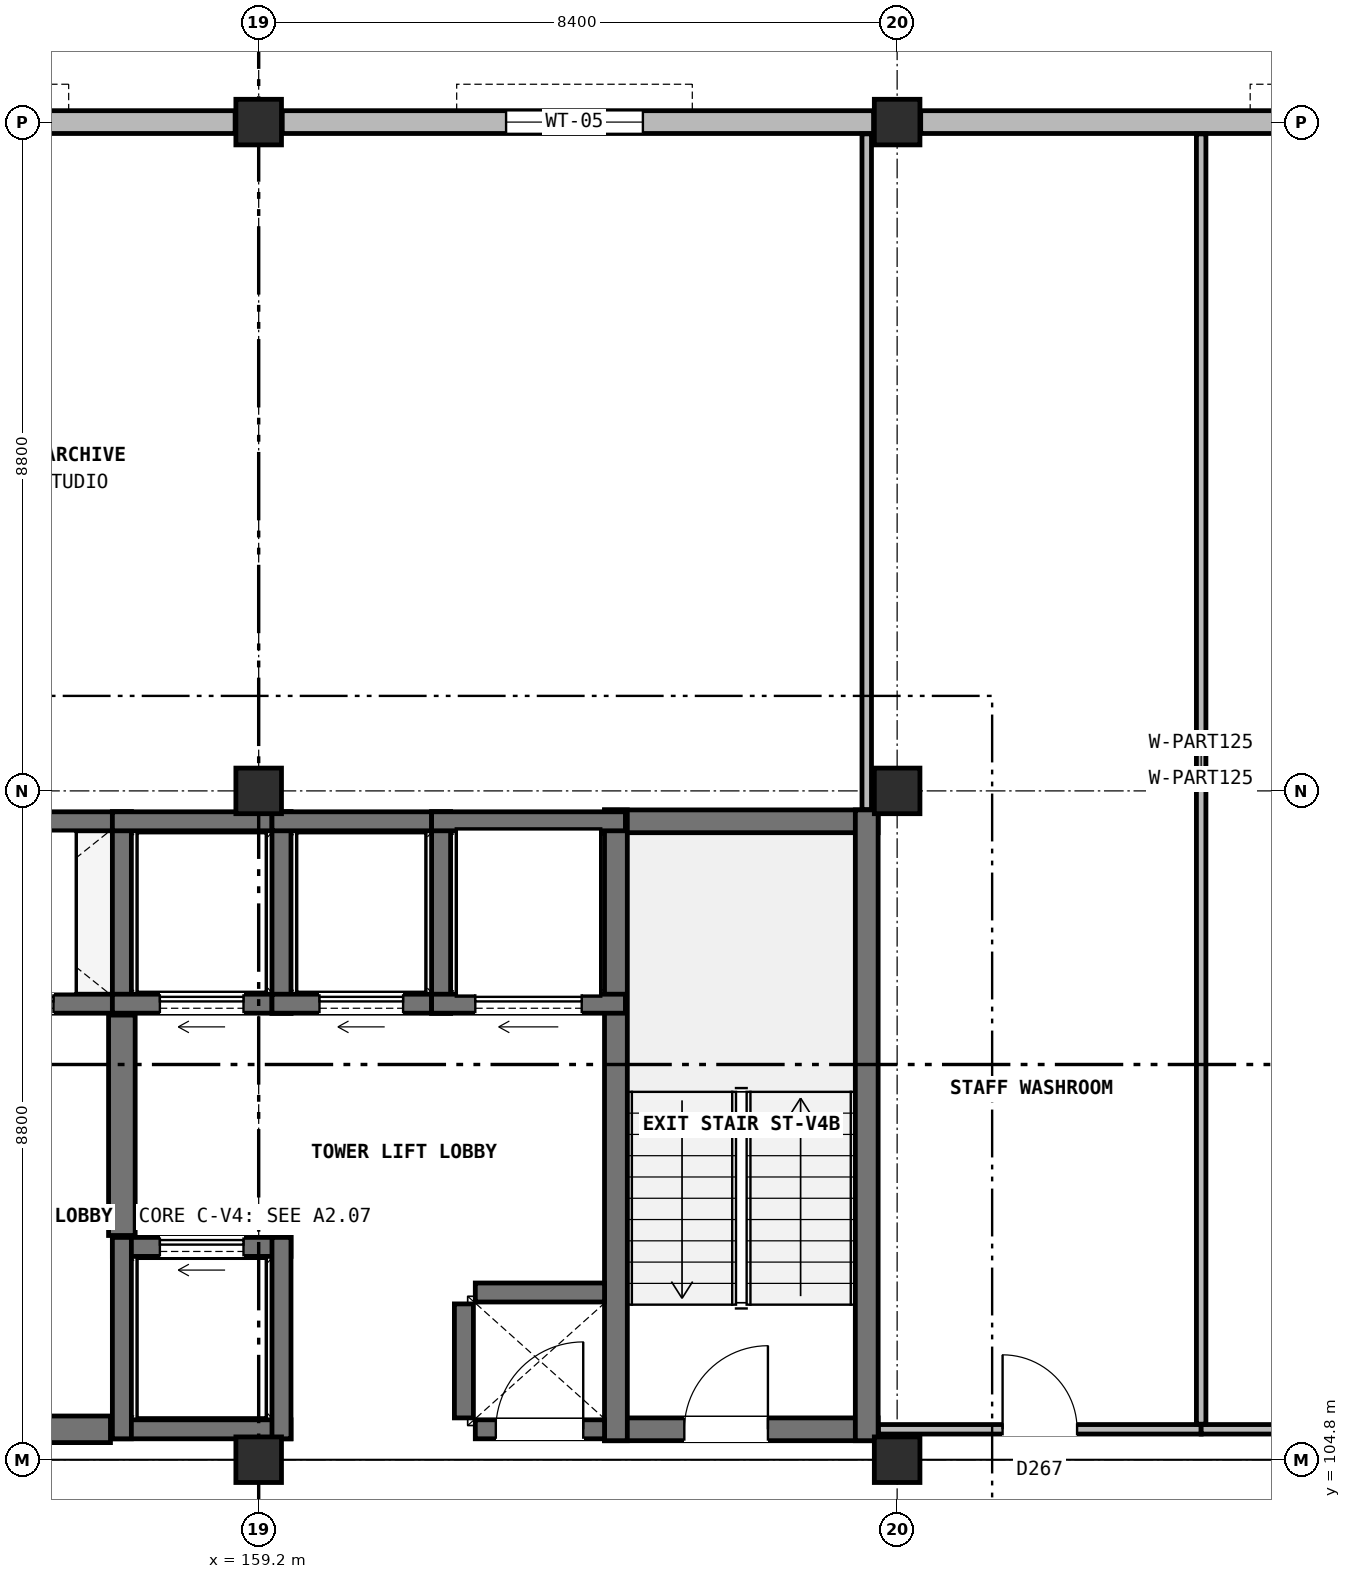
"""IFC4 building model, lengths in metres.
Left out: names, types, materials, properties, quantities, classifications, styles, units other than length and angle.
Written with IfcOpenShell. Run it as: python <this file> out.ifc"""

import sys

from ifc_helpers import new_model, si_unit, direction, frame, frame_2d, origin, origin_2d, place, context, subcontext, project, spatial, rectangle, extrude, element, fill, save


model = new_model("IFC4")
c1 = context("Model", 3, precision=1e-05, world=origin(), true_north=direction((0.0, 1.0)))
c2 = subcontext(c1, "Body", "Model", "MODEL_VIEW")
j1 = project(units=[si_unit("LENGTHUNIT", "METRE"), si_unit("PLANEANGLEUNIT", "RADIAN")], contexts=[c1])
p1 = place(None, origin())
s1 = spatial("IfcSite", under=j1, at=p1, CompositionType="ELEMENT")
p2 = place(p1, origin())
s2 = spatial("IfcBuilding", under=s1, at=p2, CompositionType="ELEMENT")
p3 = place(p2, frame((0.0, 0.0, 52.2)))
s3 = spatial("IfcBuildingStorey", under=s2, at=p3, CompositionType="ELEMENT", Elevation=52.2)
for number, where, z_axis, x_axis in (
    (1, (159.2, 104.8, 0.0), (0.0, 0.0, 1.0), (1.0, 0.0, 0.0)),
    (2, (159.2, 113.6, 0.0), (0.0, 0.0, 1.0), (1.0, 0.0, 0.0)),
    (3, (159.2, 122.4, 0.0), (0.0, 0.0, 1.0), (1.0, 0.0, 0.0)),
    (4, (167.6, 104.8, 0.0), (0.0, 0.0, 1.0), (1.0, 0.0, 0.0)),
    (5, (167.6, 113.6, 0.0), (0.0, 0.0, 1.0), (1.0, 0.0, 0.0)),
    (6, (167.6, 122.4, 0.0), (0.0, 0.0, 1.0), (1.0, 0.0, 0.0)),
):
    element("IfcColumn", number, at=place(p3, frame(where, z_axis=z_axis, x_axis=x_axis)), inside=s3, PredefinedType="COLUMN", context=c2, shape_type="SweptSolid", body=[
        extrude(rectangle(XDim=0.6, YDim=0.6, at=origin_2d()), origin(), (0.0, 0.0, 1.0), 3.8),
    ])
p4 = place(p3, frame((175.69, 122.4, 0.0), z_axis=(0.0, 0.0, 1.0), x_axis=(-1.0, 0.0, 0.0)))
e7 = element("IfcWall", 7, at=p4, inside=s3, PredefinedType="SOLIDWALL", context=c2, shape_type="SweptSolid", body=[
    extrude(rectangle(XDim=7.78, YDim=0.3, at=frame_2d((3.89, 0.0))), origin(), (0.0, 0.0, 1.0), 3.05),
])
p5 = place(p4, frame((1.22, 0.0, 0.9)))
e8 = element("IfcOpeningElement", 8, at=p5, cuts=e7, PredefinedType="OPENING", context=c2, shape_type="SweptSolid", body=[
    extrude(rectangle(XDim=1.65, YDim=1.85, at=frame_2d((0.825, 0.925))), frame((0.0, 0.16, 0.0), z_axis=(0.0, -1.0, 0.0), x_axis=(1.0, 0.0, 0.0)), (0.0, 0.0, 1.0), 0.32),
])
p6 = place(p3, frame((167.29, 122.4, 0.0), z_axis=(0.0, 0.0, 1.0), x_axis=(-1.0, 0.0, 0.0)))
e9 = element("IfcWall", 9, at=p6, inside=s3, PredefinedType="SOLIDWALL", context=c2, shape_type="SweptSolid", body=[
    extrude(rectangle(XDim=7.78, YDim=0.3, at=frame_2d((3.89, 0.0))), origin(), (0.0, 0.0, 1.0), 3.05),
])
p7 = place(p6, frame((3.035, 0.0, 0.9)))
e10 = element("IfcOpeningElement", 10, at=p7, cuts=e9, PredefinedType="OPENING", context=c2, shape_type="SweptSolid", body=[
    extrude(rectangle(XDim=1.8, YDim=1.9, at=frame_2d((0.9, 0.95))), frame((0.0, 0.16, 0.0), z_axis=(0.0, -1.0, 0.0), x_axis=(1.0, 0.0, 0.0)), (0.0, 0.0, 1.0), 0.32),
])
p8 = place(p3, frame((158.89, 122.4, 0.0), z_axis=(0.0, 0.0, 1.0), x_axis=(-1.0, 0.0, 0.0)))
e11 = element("IfcWall", 11, at=p8, inside=s3, PredefinedType="SOLIDWALL", context=c2, shape_type="SweptSolid", body=[
    extrude(rectangle(XDim=7.78, YDim=0.3, at=frame_2d((3.89, 0.0))), origin(), (0.0, 0.0, 1.0), 3.05),
])
p9 = place(p8, frame((2.915, 0.0, 0.9)))
e12 = element("IfcOpeningElement", 12, at=p9, cuts=e11, PredefinedType="OPENING", context=c2, shape_type="SweptSolid", body=[
    extrude(rectangle(XDim=1.95, YDim=1.9, at=frame_2d((0.975, 0.95))), frame((0.0, 0.16, 0.0), z_axis=(0.0, -1.0, 0.0), x_axis=(1.0, 0.0, 0.0)), (0.0, 0.0, 1.0), 0.32),
])
p10 = place(p3, frame((163.75, 105.2, 0.0), z_axis=(0.0, 0.0, 1.0), x_axis=(1.0, 0.0, 0.0)))
e13 = element("IfcWall", 13, at=p10, inside=s3, PredefinedType="SHEAR", context=c2, shape_type="SweptSolid", body=[
    extrude(rectangle(XDim=3.6, YDim=0.3, at=frame_2d((1.8, 0.0))), origin(), (0.0, 0.0, 1.0), 3.8),
])
p11 = place(p10, frame((1.05, 0.0, 0.0)))
e14 = element("IfcOpeningElement", 14, at=p11, cuts=e13, PredefinedType="OPENING", context=c2, shape_type="SweptSolid", body=[
    extrude(rectangle(XDim=1.1, YDim=2.2, at=frame_2d((0.55, 1.1))), frame((0.0, 0.16, 0.0), z_axis=(0.0, -1.0, 0.0), x_axis=(1.0, 0.0, 0.0)), (0.0, 0.0, 1.0), 0.32),
])
p12 = place(p3, frame((163.75, 113.2, 0.0), z_axis=(0.0, 0.0, 1.0), x_axis=(1.0, 0.0, 0.0)))
e15 = element("IfcWall", 15, at=p12, inside=s3, PredefinedType="SHEAR", context=c2, shape_type="SweptSolid", body=[
    extrude(rectangle(XDim=3.6, YDim=0.3, at=frame_2d((1.8, 0.0))), origin(), (0.0, 0.0, 1.0), 3.8),
])
for number, where, z_axis, x_axis in (
    (16, (163.9, 105.05, 0.0), (0.0, 0.0, 1.0), (0.0, 1.0, 0.0)),
    (17, (167.2, 105.05, 0.0), (0.0, 0.0, 1.0), (0.0, 1.0, 0.0)),
):
    element("IfcWall", number, at=place(p3, frame(where, z_axis=z_axis, x_axis=x_axis)), inside=s3, PredefinedType="SHEAR", context=c2, shape_type="SweptSolid", body=[
        extrude(rectangle(XDim=8.3, YDim=0.3, at=frame_2d((4.15, 0.0))), origin(), (0.0, 0.0, 1.0), 3.8),
    ])
p13 = place(p3, frame((154.275, 110.8, 0.0), z_axis=(0.0, 0.0, 1.0), x_axis=(1.0, 0.0, 0.0)))
e18 = element("IfcWall", 18, at=p13, inside=s3, PredefinedType="SOLIDWALL", context=c2, shape_type="SweptSolid", body=[
    extrude(rectangle(XDim=3.25, YDim=0.25, at=frame_2d((1.625, 0.0))), origin(), (0.0, 0.0, 1.0), 3.48),
])
p14 = place(p13, frame((1.025, 0.0, 0.0)))
e19 = element("IfcOpeningElement", 19, at=p14, cuts=e18, PredefinedType="OPENING", context=c2, shape_type="SweptSolid", body=[
    extrude(rectangle(XDim=1.2, YDim=2.2, at=frame_2d((0.6, 1.1))), frame((0.0, 0.135, 0.0), z_axis=(0.0, -1.0, 0.0), x_axis=(1.0, 0.0, 0.0)), (0.0, 0.0, 1.0), 0.27),
])
p15 = place(p3, frame((154.275, 113.2, 0.0), z_axis=(0.0, 0.0, 1.0), x_axis=(1.0, 0.0, 0.0)))
e20 = element("IfcWall", 20, at=p15, inside=s3, PredefinedType="SOLIDWALL", context=c2, shape_type="SweptSolid", body=[
    extrude(rectangle(XDim=3.25, YDim=0.25, at=frame_2d((1.625, 0.0))), origin(), (0.0, 0.0, 1.0), 3.48),
])
p16 = place(p3, frame((157.4, 110.675, 0.0), z_axis=(0.0, 0.0, 1.0), x_axis=(0.0, 1.0, 0.0)))
e21 = element("IfcWall", 21, at=p16, inside=s3, PredefinedType="SOLIDWALL", context=c2, shape_type="SweptSolid", body=[
    extrude(rectangle(XDim=2.65, YDim=0.25, at=frame_2d((1.325, 0.0))), origin(), (0.0, 0.0, 1.0), 3.48),
])
p17 = place(p3, frame((157.275, 110.8, 0.0), z_axis=(0.0, 0.0, 1.0), x_axis=(1.0, 0.0, 0.0)))
e22 = element("IfcWall", 22, at=p17, inside=s3, PredefinedType="SOLIDWALL", context=c2, shape_type="SweptSolid", body=[
    extrude(rectangle(XDim=2.35, YDim=0.25, at=frame_2d((1.175, 0.0))), origin(), (0.0, 0.0, 1.0), 3.48),
])
p18 = place(p17, frame((0.625, 0.0, 0.0)))
e23 = element("IfcOpeningElement", 23, at=p18, cuts=e22, PredefinedType="OPENING", context=c2, shape_type="SweptSolid", body=[
    extrude(rectangle(XDim=1.1, YDim=2.2, at=frame_2d((0.55, 1.1))), frame((0.0, 0.135, 0.0), z_axis=(0.0, -1.0, 0.0), x_axis=(1.0, 0.0, 0.0)), (0.0, 0.0, 1.0), 0.27),
])
p19 = place(p3, frame((157.275, 113.2, 0.0), z_axis=(0.0, 0.0, 1.0), x_axis=(1.0, 0.0, 0.0)))
e24 = element("IfcWall", 24, at=p19, inside=s3, PredefinedType="SOLIDWALL", context=c2, shape_type="SweptSolid", body=[
    extrude(rectangle(XDim=2.35, YDim=0.25, at=frame_2d((1.175, 0.0))), origin(), (0.0, 0.0, 1.0), 3.48),
])
p20 = place(p3, frame((159.5, 110.675, 0.0), z_axis=(0.0, 0.0, 1.0), x_axis=(0.0, 1.0, 0.0)))
e25 = element("IfcWall", 25, at=p20, inside=s3, PredefinedType="SOLIDWALL", context=c2, shape_type="SweptSolid", body=[
    extrude(rectangle(XDim=2.65, YDim=0.25, at=frame_2d((1.325, 0.0))), origin(), (0.0, 0.0, 1.0), 3.48),
])
p21 = place(p3, frame((159.375, 110.8, 0.0), z_axis=(0.0, 0.0, 1.0), x_axis=(1.0, 0.0, 0.0)))
e26 = element("IfcWall", 26, at=p21, inside=s3, PredefinedType="SOLIDWALL", context=c2, shape_type="SweptSolid", body=[
    extrude(rectangle(XDim=2.35, YDim=0.25, at=frame_2d((1.175, 0.0))), origin(), (0.0, 0.0, 1.0), 3.48),
])
p22 = place(p21, frame((0.625, 0.0, 0.0)))
e27 = element("IfcOpeningElement", 27, at=p22, cuts=e26, PredefinedType="OPENING", context=c2, shape_type="SweptSolid", body=[
    extrude(rectangle(XDim=1.1, YDim=2.2, at=frame_2d((0.55, 1.1))), frame((0.0, 0.135, 0.0), z_axis=(0.0, -1.0, 0.0), x_axis=(1.0, 0.0, 0.0)), (0.0, 0.0, 1.0), 0.27),
])
p23 = place(p3, frame((159.375, 113.2, 0.0), z_axis=(0.0, 0.0, 1.0), x_axis=(1.0, 0.0, 0.0)))
e28 = element("IfcWall", 28, at=p23, inside=s3, PredefinedType="SOLIDWALL", context=c2, shape_type="SweptSolid", body=[
    extrude(rectangle(XDim=2.35, YDim=0.25, at=frame_2d((1.175, 0.0))), origin(), (0.0, 0.0, 1.0), 3.48),
])
p24 = place(p3, frame((161.6, 110.675, 0.0), z_axis=(0.0, 0.0, 1.0), x_axis=(0.0, 1.0, 0.0)))
e29 = element("IfcWall", 29, at=p24, inside=s3, PredefinedType="SOLIDWALL", context=c2, shape_type="SweptSolid", body=[
    extrude(rectangle(XDim=2.65, YDim=0.25, at=frame_2d((1.325, 0.0))), origin(), (0.0, 0.0, 1.0), 3.48),
])
p25 = place(p3, frame((157.275, 105.2, 0.0), z_axis=(0.0, 0.0, 1.0), x_axis=(1.0, 0.0, 0.0)))
e30 = element("IfcWall", 30, at=p25, inside=s3, PredefinedType="SOLIDWALL", context=c2, shape_type="SweptSolid", body=[
    extrude(rectangle(XDim=2.35, YDim=0.25, at=frame_2d((1.175, 0.0))), origin(), (0.0, 0.0, 1.0), 3.48),
])
p26 = place(p3, frame((157.275, 107.6, 0.0), z_axis=(0.0, 0.0, 1.0), x_axis=(1.0, 0.0, 0.0)))
e31 = element("IfcWall", 31, at=p26, inside=s3, PredefinedType="SOLIDWALL", context=c2, shape_type="SweptSolid", body=[
    extrude(rectangle(XDim=2.35, YDim=0.25, at=frame_2d((1.175, 0.0))), origin(), (0.0, 0.0, 1.0), 3.48),
])
p27 = place(p26, frame((0.625, 0.0, 0.0)))
e32 = element("IfcOpeningElement", 32, at=p27, cuts=e31, PredefinedType="OPENING", context=c2, shape_type="SweptSolid", body=[
    extrude(rectangle(XDim=1.1, YDim=2.2, at=frame_2d((0.55, 1.1))), frame((0.0, 0.135, 0.0), z_axis=(0.0, -1.0, 0.0), x_axis=(1.0, 0.0, 0.0)), (0.0, 0.0, 1.0), 0.27),
])
for number, where, z_axis, x_axis in (
    (33, (157.4, 105.075, 0.0), (0.0, 0.0, 1.0), (0.0, 1.0, 0.0)),
    (34, (159.5, 105.075, 0.0), (0.0, 0.0, 1.0), (0.0, 1.0, 0.0)),
):
    element("IfcWall", number, at=place(p3, frame(where, z_axis=z_axis, x_axis=x_axis)), inside=s3, PredefinedType="SOLIDWALL", context=c2, shape_type="SweptSolid", body=[
        extrude(rectangle(XDim=2.65, YDim=0.25, at=frame_2d((1.325, 0.0))), origin(), (0.0, 0.0, 1.0), 3.48),
    ])
p28 = place(p3, frame((161.475, 110.8, 0.0), z_axis=(0.0, 0.0, 1.0), x_axis=(1.0, 0.0, 0.0)))
e35 = element("IfcWall", 35, at=p28, inside=s3, PredefinedType="SOLIDWALL", context=c2, shape_type="SweptSolid", body=[
    extrude(rectangle(XDim=2.55, YDim=0.25, at=frame_2d((1.275, 0.0))), origin(), (0.0, 0.0, 1.0), 3.48),
])
p29 = place(p28, frame((0.575, 0.0, 0.0)))
e36 = element("IfcOpeningElement", 36, at=p29, cuts=e35, PredefinedType="OPENING", context=c2, shape_type="SweptSolid", body=[
    extrude(rectangle(XDim=1.4, YDim=2.3, at=frame_2d((0.7, 1.15))), frame((0.0, 0.135, 0.0), z_axis=(0.0, -1.0, 0.0), x_axis=(1.0, 0.0, 0.0)), (0.0, 0.0, 1.0), 0.27),
])
p30 = place(p3, frame((161.475, 113.2, 0.0), z_axis=(0.0, 0.0, 1.0), x_axis=(1.0, 0.0, 0.0)))
e37 = element("IfcWall", 37, at=p30, inside=s3, PredefinedType="SOLIDWALL", context=c2, shape_type="SweptSolid", body=[
    extrude(rectangle(XDim=2.55, YDim=0.25, at=frame_2d((1.275, 0.0))), origin(), (0.0, 0.0, 1.0), 3.48),
])
p31 = place(p3, frame((157.4, 107.75, 0.0), z_axis=(0.0, 0.0, 1.0), x_axis=(0.0, 1.0, 0.0)))
e38 = element("IfcWall", 38, at=p31, inside=s3, PredefinedType="SHEAR", context=c2, shape_type="SweptSolid", body=[
    extrude(rectangle(XDim=2.9, YDim=0.35, at=frame_2d((1.45, 0.0))), origin(), (0.0, 0.0, 1.0), 3.48),
])
p32 = place(p3, frame((154.55, 105.2, 0.0), z_axis=(0.0, 0.0, 1.0), x_axis=(1.0, 0.0, 0.0)))
e39 = element("IfcWall", 39, at=p32, inside=s3, PredefinedType="SHEAR", context=c2, shape_type="SweptSolid", body=[
    extrude(rectangle(XDim=2.7, YDim=0.35, at=frame_2d((1.35, 0.0))), origin(), (0.0, 0.0, 1.0), 3.48),
])
p33 = place(p32, frame((0.8, 0.0, 0.0)))
e40 = element("IfcOpeningElement", 40, at=p33, cuts=e39, PredefinedType="OPENING", context=c2, shape_type="SweptSolid", body=[
    extrude(rectangle(XDim=1.1, YDim=2.2, at=frame_2d((0.55, 1.1))), frame((0.0, 0.185, 0.0), z_axis=(0.0, -1.0, 0.0), x_axis=(1.0, 0.0, 0.0)), (0.0, 0.0, 1.0), 0.37),
])
p34 = place(p3, frame((161.9, 105.35, 0.0), z_axis=(0.0, 0.0, 1.0), x_axis=(0.0, 1.0, 0.0)))
e41 = element("IfcWall", 41, at=p34, inside=s3, PredefinedType="SOLIDWALL", context=c2, shape_type="SweptSolid", body=[
    extrude(rectangle(XDim=1.5, YDim=0.25, at=frame_2d((0.75, 0.0))), origin(), (0.0, 0.0, 1.0), 3.48),
])
p35 = place(p3, frame((162.05, 107.0, 0.0), z_axis=(0.0, 0.0, 1.0), x_axis=(1.0, 0.0, 0.0)))
e42 = element("IfcWall", 42, at=p35, inside=s3, PredefinedType="SOLIDWALL", context=c2, shape_type="SweptSolid", body=[
    extrude(rectangle(XDim=1.7, YDim=0.25, at=frame_2d((0.85, 0.0))), origin(), (0.0, 0.0, 1.0), 3.48),
])
p36 = place(p3, frame((162.05, 105.2, 0.0), z_axis=(0.0, 0.0, 1.0), x_axis=(1.0, 0.0, 0.0)))
e43 = element("IfcWall", 43, at=p36, inside=s3, PredefinedType="SOLIDWALL", context=c2, shape_type="SweptSolid", body=[
    extrude(rectangle(XDim=1.7, YDim=0.25, at=frame_2d((0.85, 0.0))), origin(), (0.0, 0.0, 1.0), 3.48),
])
p37 = place(p36, frame((0.27, 0.0, 0.0)))
e44 = element("IfcOpeningElement", 44, at=p37, cuts=e43, PredefinedType="OPENING", context=c2, shape_type="SweptSolid", body=[
    extrude(rectangle(XDim=1.15, YDim=2.2, at=frame_2d((0.575, 1.1))), frame((0.0, 0.135, 0.0), z_axis=(0.0, -1.0, 0.0), x_axis=(1.0, 0.0, 0.0)), (0.0, 0.0, 1.0), 0.27),
])
p38 = place(p3, frame((167.355, 105.2, 0.0), z_axis=(0.0, 0.0, 1.0), x_axis=(1.0, 0.0, 0.0)))
e45 = element("IfcWall", 45, at=p38, inside=s3, PredefinedType="PARTITIONING", context=c2, shape_type="SweptSolid", body=[
    extrude(rectangle(XDim=4.245, YDim=0.125, at=frame_2d((2.123, 0.0))), origin(), (0.0, 0.0, 1.0), 3.045),
])
p39 = place(p38, frame((1.633, 0.0, 0.0)))
e46 = element("IfcOpeningElement", 46, at=p39, cuts=e45, PredefinedType="OPENING", context=c2, shape_type="SweptSolid", body=[
    extrude(rectangle(XDim=0.98, YDim=2.1, at=frame_2d((0.49, 1.05))), frame((0.0, 0.073, 0.0), z_axis=(0.0, -1.0, 0.0), x_axis=(1.0, 0.0, 0.0)), (0.0, 0.0, 1.0), 0.145),
])
p40 = place(p3, frame((171.6, 105.2, 0.0), z_axis=(0.0, 0.0, 1.0), x_axis=(1.0, 0.0, 0.0)))
e47 = element("IfcWall", 47, at=p40, inside=s3, PredefinedType="PARTITIONING", context=c2, shape_type="SweptSolid", body=[
    extrude(rectangle(XDim=4.4, YDim=0.125, at=frame_2d((2.2, 0.0))), origin(), (0.0, 0.0, 1.0), 3.045),
])
p41 = place(p40, frame((1.71, 0.0, 0.0)))
e48 = element("IfcOpeningElement", 48, at=p41, cuts=e47, PredefinedType="OPENING", context=c2, shape_type="SweptSolid", body=[
    extrude(rectangle(XDim=0.98, YDim=2.1, at=frame_2d((0.49, 1.05))), frame((0.0, 0.073, 0.0), z_axis=(0.0, -1.0, 0.0), x_axis=(1.0, 0.0, 0.0)), (0.0, 0.0, 1.0), 0.145),
])
p42 = place(p3, frame((167.2, 113.355, 0.0), z_axis=(0.0, 0.0, 1.0), x_axis=(0.0, 1.0, 0.0)))
e49 = element("IfcWall", 49, at=p42, inside=s3, PredefinedType="PARTITIONING", context=c2, shape_type="SweptSolid", body=[
    extrude(rectangle(XDim=8.89, YDim=0.125, at=frame_2d((4.445, 0.0))), origin(), (0.0, 0.0, 1.0), 3.045),
])
p43 = place(p3, frame((171.6, 105.268, 0.0), z_axis=(0.0, 0.0, 1.0), x_axis=(0.0, 1.0, 0.0)))
e50 = element("IfcWall", 50, at=p43, inside=s3, PredefinedType="PARTITIONING", context=c2, shape_type="SweptSolid", body=[
    extrude(rectangle(XDim=16.978, YDim=0.125, at=frame_2d((8.489, 0.0))), origin(), (0.0, 0.0, 1.0), 3.465),
])
p44 = place(p7, origin())
e51 = element("IfcWindow", 51, at=p44, inside=s3, PartitioningType="SINGLE_PANEL", PredefinedType="WINDOW", context=c2, shape_type="SweptSolid", body=[
    extrude(rectangle(XDim=1.8, YDim=1.9, at=frame_2d((0.9, 0.95))), frame((0.0, 0.03, 0.0), z_axis=(0.0, -1.0, 0.0), x_axis=(1.0, 0.0, 0.0)), (0.0, 0.0, 1.0), 0.06),
])
fill(e10, e51)
p45 = place(p11, origin())
e52 = element("IfcDoor", 52, at=p45, inside=s3, OperationType="SINGLE_SWING_RIGHT", PredefinedType="DOOR", context=c2, shape_type="SweptSolid", body=[
    extrude(rectangle(XDim=1.1, YDim=2.2, at=frame_2d((0.55, 1.1))), frame((0.0, 0.025, 0.0), z_axis=(0.0, -1.0, 0.0), x_axis=(1.0, 0.0, 0.0)), (0.0, 0.0, 1.0), 0.05),
])
fill(e14, e52)
p46 = place(p14, origin())
e53 = element("IfcDoor", 53, at=p46, inside=s3, OperationType="SLIDING_TO_LEFT", PredefinedType="DOOR", context=c2, shape_type="SweptSolid", body=[
    extrude(rectangle(XDim=1.2, YDim=2.2, at=frame_2d((0.6, 1.1))), frame((0.0, 0.025, 0.0), z_axis=(0.0, -1.0, 0.0), x_axis=(1.0, 0.0, 0.0)), (0.0, 0.0, 1.0), 0.05),
])
fill(e19, e53)
p47 = place(p18, origin())
e54 = element("IfcDoor", 54, at=p47, inside=s3, OperationType="SLIDING_TO_LEFT", PredefinedType="DOOR", context=c2, shape_type="SweptSolid", body=[
    extrude(rectangle(XDim=1.1, YDim=2.2, at=frame_2d((0.55, 1.1))), frame((0.0, 0.025, 0.0), z_axis=(0.0, -1.0, 0.0), x_axis=(1.0, 0.0, 0.0)), (0.0, 0.0, 1.0), 0.05),
])
fill(e23, e54)
p48 = place(p22, origin())
e55 = element("IfcDoor", 55, at=p48, inside=s3, OperationType="SLIDING_TO_LEFT", PredefinedType="DOOR", context=c2, shape_type="SweptSolid", body=[
    extrude(rectangle(XDim=1.1, YDim=2.2, at=frame_2d((0.55, 1.1))), frame((0.0, 0.025, 0.0), z_axis=(0.0, -1.0, 0.0), x_axis=(1.0, 0.0, 0.0)), (0.0, 0.0, 1.0), 0.05),
])
fill(e27, e55)
p49 = place(p27, origin())
e56 = element("IfcDoor", 56, at=p49, inside=s3, OperationType="SLIDING_TO_LEFT", PredefinedType="DOOR", context=c2, shape_type="SweptSolid", body=[
    extrude(rectangle(XDim=1.1, YDim=2.2, at=frame_2d((0.55, 1.1))), frame((0.0, 0.025, 0.0), z_axis=(0.0, -1.0, 0.0), x_axis=(1.0, 0.0, 0.0)), (0.0, 0.0, 1.0), 0.05),
])
fill(e32, e56)
p50 = place(p29, origin())
e57 = element("IfcDoor", 57, at=p50, inside=s3, OperationType="SLIDING_TO_LEFT", PredefinedType="DOOR", context=c2, shape_type="SweptSolid", body=[
    extrude(rectangle(XDim=1.4, YDim=2.3, at=frame_2d((0.7, 1.15))), frame((0.0, 0.025, 0.0), z_axis=(0.0, -1.0, 0.0), x_axis=(1.0, 0.0, 0.0)), (0.0, 0.0, 1.0), 0.05),
])
fill(e36, e57)
p51 = place(p37, origin())
e58 = element("IfcDoor", 58, at=p51, inside=s3, OperationType="SINGLE_SWING_RIGHT", PredefinedType="DOOR", context=c2, shape_type="SweptSolid", body=[
    extrude(rectangle(XDim=1.15, YDim=2.2, at=frame_2d((0.575, 1.1))), frame((0.0, 0.025, 0.0), z_axis=(0.0, -1.0, 0.0), x_axis=(1.0, 0.0, 0.0)), (0.0, 0.0, 1.0), 0.05),
])
fill(e44, e58)
p52 = place(p39, origin())
e59 = element("IfcDoor", 59, at=p52, inside=s3, OperationType="SINGLE_SWING_LEFT", PredefinedType="DOOR", context=c2, shape_type="SweptSolid", body=[
    extrude(rectangle(XDim=0.98, YDim=2.1, at=frame_2d((0.49, 1.05))), frame((0.0, 0.025, 0.0), z_axis=(0.0, -1.0, 0.0), x_axis=(1.0, 0.0, 0.0)), (0.0, 0.0, 1.0), 0.05),
])
fill(e46, e59)
save(model, sys.argv[1])
